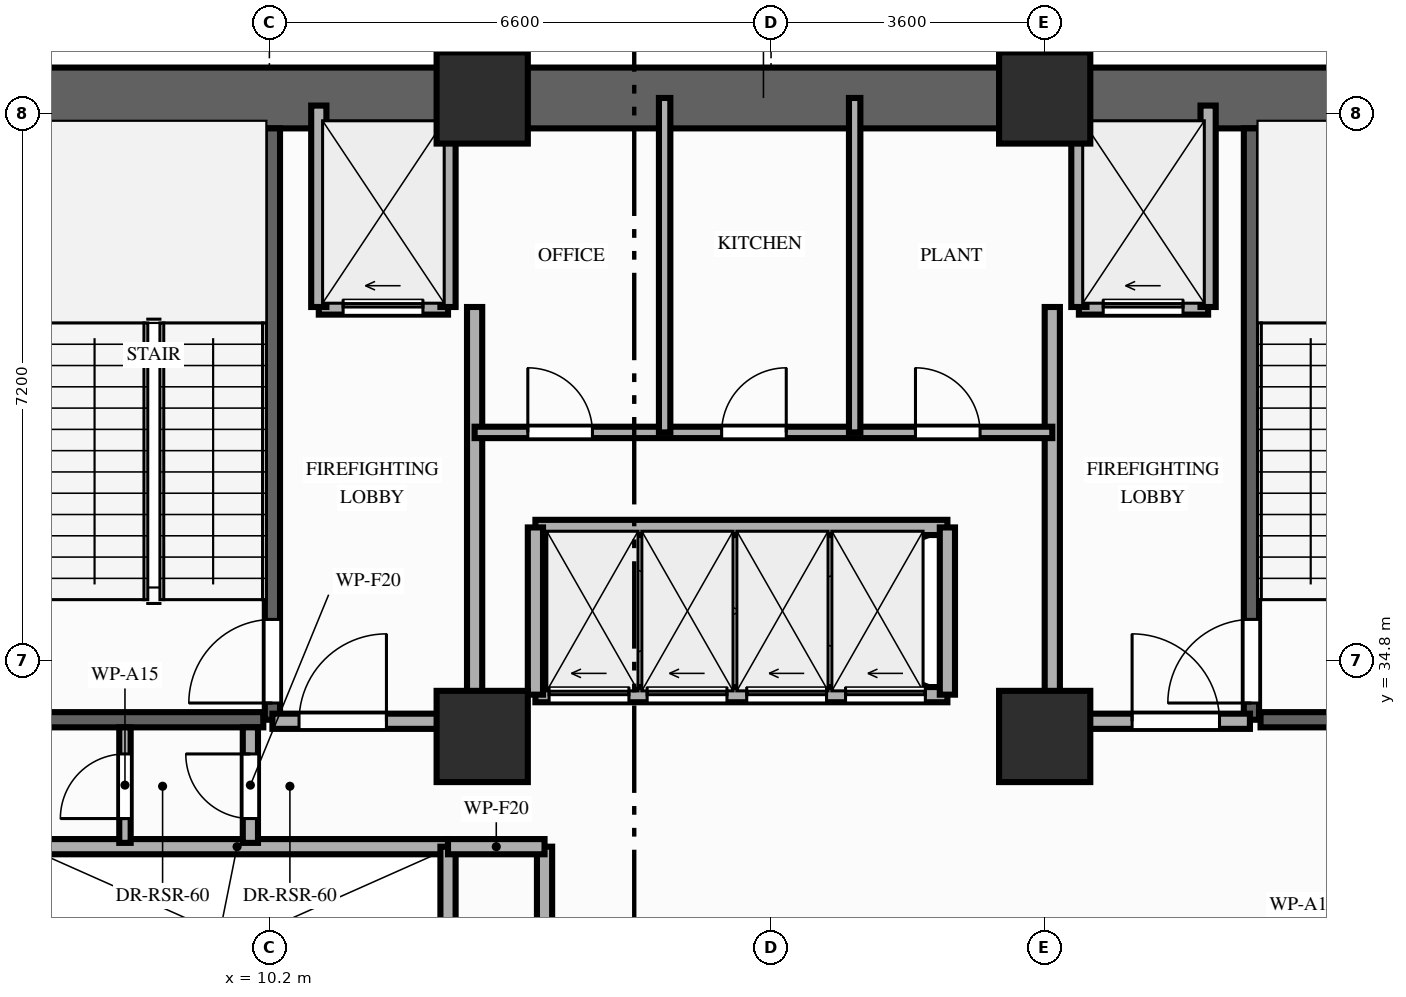
"""IFC4 building model, lengths in metres.
Left out: names, types, materials, properties, quantities, classifications, styles, units other than length and angle.
Written with IfcOpenShell. Run it as: python <this file> out.ifc"""

import sys

from ifc_helpers import new_model, si_unit, direction, frame, frame_2d, origin, origin_2d, place, context, subcontext, project, spatial, rectangle, extrude, element, fill, save


model = new_model("IFC4")
c1 = context("Model", 3, precision=1e-05, world=origin(), true_north=direction((0.0, 1.0)))
c2 = subcontext(c1, "Body", "Model", "MODEL_VIEW")
j1 = project(units=[si_unit("LENGTHUNIT", "METRE"), si_unit("PLANEANGLEUNIT", "RADIAN")], contexts=[c1])
p1 = place(None, origin())
s1 = spatial("IfcSite", under=j1, at=p1, CompositionType="ELEMENT")
p2 = place(p1, origin())
s2 = spatial("IfcBuilding", under=s1, at=p2, CompositionType="ELEMENT")
p3 = place(p2, frame((0.0, 0.0, 102.6)))
s3 = spatial("IfcBuildingStorey", under=s2, at=p3, CompositionType="ELEMENT", Elevation=102.6)
for number, where, z_axis, x_axis in (
    (1, (13.0, 33.8, 0.0), (0.0, 0.0, 1.0), (1.0, 0.0, 0.0)),
    (2, (20.4, 33.8, 0.0), (0.0, 0.0, 1.0), (1.0, 0.0, 0.0)),
    (3, (13.0, 42.2, 0.0), (0.0, 0.0, 1.0), (1.0, 0.0, 0.0)),
    (4, (20.4, 42.2, 0.0), (0.0, 0.0, 1.0), (1.0, 0.0, 0.0)),
):
    element("IfcColumn", number, at=place(p3, frame(where, z_axis=z_axis, x_axis=x_axis)), inside=s3, PredefinedType="COLUMN", context=c2, shape_type="SweptSolid", body=[
        extrude(rectangle(XDim=1.2, YDim=1.2, at=origin_2d()), origin(), (0.0, 0.0, 1.0), 4.8),
    ])
p4 = place(p3, frame((6.45, 42.2, 0.0), z_axis=(0.0, 0.0, 1.0), x_axis=(1.0, 0.0, 0.0)))
e5 = element("IfcWall", 5, at=p4, inside=s3, PredefinedType="SHEAR", context=c2, shape_type="SweptSolid", body=[
    extrude(rectangle(XDim=20.45, YDim=0.8, at=frame_2d((10.225, 0.0))), origin(), (0.0, 0.0, 1.0), 4.56),
])
p5 = place(p3, frame((10.24, 34.02, 0.0), z_axis=(0.0, 0.0, 1.0), x_axis=(0.0, 1.0, 0.0)))
e6 = element("IfcWall", 6, at=p5, inside=s3, PredefinedType="SHEAR", context=c2, shape_type="SweptSolid", body=[
    extrude(rectangle(XDim=7.78, YDim=0.2, at=frame_2d((3.89, 0.0))), origin(), (0.0, 0.0, 1.0), 4.56),
])
p6 = place(p5, frame((0.22, 0.0, 0.0)))
e7 = element("IfcOpeningElement", 7, at=p6, cuts=e6, PredefinedType="OPENING", context=c2, shape_type="SweptSolid", body=[
    extrude(rectangle(XDim=1.1, YDim=2.15, at=frame_2d((0.55, 1.075))), frame((0.0, 0.11, 0.0), z_axis=(0.0, -1.0, 0.0), x_axis=(1.0, 0.0, 0.0)), (0.0, 0.0, 1.0), 0.22),
])
p7 = place(p3, frame((7.24, 34.02, 0.0), z_axis=(0.0, 0.0, 1.0), x_axis=(1.0, 0.0, 0.0)))
e8 = element("IfcWall", 8, at=p7, inside=s3, PredefinedType="SHEAR", context=c2, shape_type="SweptSolid", body=[
    extrude(rectangle(XDim=2.88, YDim=0.2, at=frame_2d((1.44, 0.0))), origin(), (0.0, 0.0, 1.0), 4.56),
])
p8 = place(p3, frame((23.12, 34.02, 0.0), z_axis=(0.0, 0.0, 1.0), x_axis=(0.0, 1.0, 0.0)))
e9 = element("IfcWall", 9, at=p8, inside=s3, PredefinedType="SHEAR", context=c2, shape_type="SweptSolid", body=[
    extrude(rectangle(XDim=7.78, YDim=0.2, at=frame_2d((3.89, 0.0))), origin(), (0.0, 0.0, 1.0), 4.56),
])
p9 = place(p8, frame((0.22, 0.0, 0.0)))
e10 = element("IfcOpeningElement", 10, at=p9, cuts=e9, PredefinedType="OPENING", context=c2, shape_type="SweptSolid", body=[
    extrude(rectangle(XDim=1.1, YDim=2.15, at=frame_2d((0.55, 1.075))), frame((0.0, 0.11, 0.0), z_axis=(0.0, -1.0, 0.0), x_axis=(1.0, 0.0, 0.0)), (0.0, 0.0, 1.0), 0.22),
])
p10 = place(p3, frame((23.24, 34.02, 0.0), z_axis=(0.0, 0.0, 1.0), x_axis=(1.0, 0.0, 0.0)))
e11 = element("IfcWall", 11, at=p10, inside=s3, PredefinedType="SHEAR", context=c2, shape_type="SweptSolid", body=[
    extrude(rectangle(XDim=2.88, YDim=0.2, at=frame_2d((1.44, 0.0))), origin(), (0.0, 0.0, 1.0), 4.56),
])
p11 = place(p3, frame((7.0, 32.35, 0.0), z_axis=(0.0, 0.0, 1.0), x_axis=(1.0, 0.0, 0.0)))
e12 = element("IfcWall", 12, at=p11, inside=s3, PredefinedType="MOVABLE", context=c2, shape_type="SweptSolid", body=[
    extrude(rectangle(XDim=5.55, YDim=0.2, at=frame_2d((2.775, 0.0))), origin(), (0.0, 0.0, 1.0), 4.56),
])
p12 = place(p3, frame((12.55, 29.85, 0.0), z_axis=(0.0, 0.0, 1.0), x_axis=(0.0, 1.0, 0.0)))
e13 = element("IfcWall", 13, at=p12, inside=s3, PredefinedType="MOVABLE", context=c2, shape_type="SweptSolid", body=[
    extrude(rectangle(XDim=2.5, YDim=0.2, at=frame_2d((1.25, 0.0))), origin(), (0.0, 0.0, 1.0), 4.56),
])
p13 = place(p3, frame((10.85, 39.45, 0.0), z_axis=(0.0, 0.0, 1.0), x_axis=(1.0, 0.0, 0.0)))
e14 = element("IfcWall", 14, at=p13, inside=s3, PredefinedType="MOVABLE", context=c2, shape_type="SweptSolid", body=[
    extrude(rectangle(XDim=1.7, YDim=0.2, at=frame_2d((0.85, 0.0))), origin(), (0.0, 0.0, 1.0), 4.56),
])
p14 = place(p13, frame((0.32, 0.0, 0.0)))
e15 = element("IfcOpeningElement", 15, at=p14, cuts=e14, PredefinedType="OPENING", context=c2, shape_type="SweptSolid", body=[
    extrude(rectangle(XDim=1.05, YDim=2.15, at=frame_2d((0.525, 1.075))), frame((0.0, 0.11, 0.0), z_axis=(0.0, -1.0, 0.0), x_axis=(1.0, 0.0, 0.0)), (0.0, 0.0, 1.0), 0.22),
])
p15 = place(p3, frame((20.85, 39.45, 0.0), z_axis=(0.0, 0.0, 1.0), x_axis=(1.0, 0.0, 0.0)))
e16 = element("IfcWall", 16, at=p15, inside=s3, PredefinedType="MOVABLE", context=c2, shape_type="SweptSolid", body=[
    extrude(rectangle(XDim=1.7, YDim=0.2, at=frame_2d((0.85, 0.0))), origin(), (0.0, 0.0, 1.0), 4.56),
])
p16 = place(p15, frame((0.32, 0.0, 0.0)))
e17 = element("IfcOpeningElement", 17, at=p16, cuts=e16, PredefinedType="OPENING", context=c2, shape_type="SweptSolid", body=[
    extrude(rectangle(XDim=1.05, YDim=2.15, at=frame_2d((0.525, 1.075))), frame((0.0, 0.11, 0.0), z_axis=(0.0, -1.0, 0.0), x_axis=(1.0, 0.0, 0.0)), (0.0, 0.0, 1.0), 0.22),
])
for number, where, z_axis, x_axis in (
    (18, (10.85, 39.45, 0.0), (0.0, 0.0, 1.0), (0.0, 1.0, 0.0)),
    (19, (12.55, 39.45, 0.0), (0.0, 0.0, 1.0), (0.0, 1.0, 0.0)),
):
    element("IfcWall", number, at=place(p3, frame(where, z_axis=z_axis, x_axis=x_axis)), inside=s3, PredefinedType="MOVABLE", context=c2, shape_type="SweptSolid", body=[
        extrude(rectangle(XDim=2.65, YDim=0.2, at=frame_2d((1.325, 0.0))), origin(), (0.0, 0.0, 1.0), 3.95),
    ])
p17 = place(p3, frame((12.9, 34.0, 0.0), z_axis=(0.0, 0.0, 1.0), x_axis=(0.0, 1.0, 0.0)))
e20 = element("IfcWall", 20, at=p17, inside=s3, PredefinedType="PARTITIONING", context=c2, shape_type="SweptSolid", body=[
    extrude(rectangle(XDim=5.45, YDim=0.2, at=frame_2d((2.725, 0.0))), origin(), (0.0, 0.0, 1.0), 3.95),
])
p18 = place(p3, frame((10.24, 34.0, 0.0), z_axis=(0.0, 0.0, 1.0), x_axis=(1.0, 0.0, 0.0)))
e21 = element("IfcWall", 21, at=p18, inside=s3, PredefinedType="PARTITIONING", context=c2, shape_type="SweptSolid", body=[
    extrude(rectangle(XDim=2.66, YDim=0.2, at=frame_2d((1.33, 0.0))), origin(), (0.0, 0.0, 1.0), 3.95),
])
p19 = place(p18, frame((0.35, 0.0, 0.0)))
e22 = element("IfcOpeningElement", 22, at=p19, cuts=e21, PredefinedType="OPENING", context=c2, shape_type="SweptSolid", body=[
    extrude(rectangle(XDim=1.15, YDim=2.15, at=frame_2d((0.575, 1.075))), frame((0.0, 0.11, 0.0), z_axis=(0.0, -1.0, 0.0), x_axis=(1.0, 0.0, 0.0)), (0.0, 0.0, 1.0), 0.22),
])
for number, where, z_axis, x_axis in (
    (23, (20.85, 39.45, 0.0), (0.0, 0.0, 1.0), (0.0, 1.0, 0.0)),
    (24, (22.55, 39.45, 0.0), (0.0, 0.0, 1.0), (0.0, 1.0, 0.0)),
):
    element("IfcWall", number, at=place(p3, frame(where, z_axis=z_axis, x_axis=x_axis)), inside=s3, PredefinedType="MOVABLE", context=c2, shape_type="SweptSolid", body=[
        extrude(rectangle(XDim=2.65, YDim=0.2, at=frame_2d((1.325, 0.0))), origin(), (0.0, 0.0, 1.0), 3.95),
    ])
p20 = place(p3, frame((20.5, 34.0, 0.0), z_axis=(0.0, 0.0, 1.0), x_axis=(0.0, 1.0, 0.0)))
e25 = element("IfcWall", 25, at=p20, inside=s3, PredefinedType="PARTITIONING", context=c2, shape_type="SweptSolid", body=[
    extrude(rectangle(XDim=5.45, YDim=0.2, at=frame_2d((2.725, 0.0))), origin(), (0.0, 0.0, 1.0), 3.95),
])
p21 = place(p3, frame((20.5, 34.0, 0.0), z_axis=(0.0, 0.0, 1.0), x_axis=(1.0, 0.0, 0.0)))
e26 = element("IfcWall", 26, at=p21, inside=s3, PredefinedType="PARTITIONING", context=c2, shape_type="SweptSolid", body=[
    extrude(rectangle(XDim=2.6, YDim=0.2, at=frame_2d((1.3, 0.0))), origin(), (0.0, 0.0, 1.0), 3.95),
])
p22 = place(p21, frame((1.05, 0.0, 0.0)))
e27 = element("IfcOpeningElement", 27, at=p22, cuts=e26, PredefinedType="OPENING", context=c2, shape_type="SweptSolid", body=[
    extrude(rectangle(XDim=1.15, YDim=2.15, at=frame_2d((0.575, 1.075))), frame((0.0, 0.11, 0.0), z_axis=(0.0, -1.0, 0.0), x_axis=(1.0, 0.0, 0.0)), (0.0, 0.0, 1.0), 0.22),
])
p23 = place(p3, frame((9.95, 32.4, 0.0), z_axis=(0.0, 0.0, 1.0), x_axis=(0.0, 1.0, 0.0)))
e28 = element("IfcWall", 28, at=p23, inside=s3, PredefinedType="PARTITIONING", context=c2, shape_type="SweptSolid", body=[
    extrude(rectangle(XDim=1.52, YDim=0.2, at=frame_2d((0.76, 0.0))), origin(), (0.0, 0.0, 1.0), 3.95),
])
p24 = place(p23, frame((0.32, 0.0, 0.0)))
e29 = element("IfcOpeningElement", 29, at=p24, cuts=e28, PredefinedType="OPENING", context=c2, shape_type="SweptSolid", body=[
    extrude(rectangle(XDim=0.85, YDim=2.05, at=frame_2d((0.425, 1.025))), frame((0.0, 0.11, 0.0), z_axis=(0.0, -1.0, 0.0), x_axis=(1.0, 0.0, 0.0)), (0.0, 0.0, 1.0), 0.22),
])
p25 = place(p3, frame((8.3, 32.4, 0.0), z_axis=(0.0, 0.0, 1.0), x_axis=(0.0, 1.0, 0.0)))
e30 = element("IfcWall", 30, at=p25, inside=s3, PredefinedType="PARTITIONING", context=c2, shape_type="SweptSolid", body=[
    extrude(rectangle(XDim=1.52, YDim=0.15, at=frame_2d((0.76, 0.0))), origin(), (0.0, 0.0, 1.0), 3.95),
])
p26 = place(p25, frame((0.32, 0.0, 0.0)))
e31 = element("IfcOpeningElement", 31, at=p26, cuts=e30, PredefinedType="OPENING", context=c2, shape_type="SweptSolid", body=[
    extrude(rectangle(XDim=0.85, YDim=2.05, at=frame_2d((0.425, 1.025))), frame((0.0, 0.085, 0.0), z_axis=(0.0, -1.0, 0.0), x_axis=(1.0, 0.0, 0.0)), (0.0, 0.0, 1.0), 0.17),
])
p27 = place(p3, frame((13.82, 29.85, 0.0), z_axis=(0.0, 0.0, 1.0), x_axis=(0.0, 1.0, 0.0)))
e32 = element("IfcWall", 32, at=p27, inside=s3, PredefinedType="PARTITIONING", context=c2, shape_type="SweptSolid", body=[
    extrude(rectangle(XDim=2.5, YDim=0.2, at=frame_2d((1.25, 0.0))), origin(), (0.0, 0.0, 1.0), 4.56),
])
p28 = place(p3, frame((12.55, 32.35, 0.0), z_axis=(0.0, 0.0, 1.0), x_axis=(1.0, 0.0, 0.0)))
e33 = element("IfcWall", 33, at=p28, inside=s3, PredefinedType="PARTITIONING", context=c2, shape_type="SweptSolid", body=[
    extrude(rectangle(XDim=1.27, YDim=0.2, at=frame_2d((0.635, 0.0))), origin(), (0.0, 0.0, 1.0), 4.56),
])
p29 = place(p3, frame((12.9, 37.8, 0.0), z_axis=(0.0, 0.0, 1.0), x_axis=(1.0, 0.0, 0.0)))
e34 = element("IfcWall", 34, at=p29, inside=s3, PredefinedType="PARTITIONING", context=c2, shape_type="SweptSolid", body=[
    extrude(rectangle(XDim=7.6, YDim=0.15, at=frame_2d((3.8, 0.0))), origin(), (0.0, 0.0, 1.0), 4.56),
])
p30 = place(p29, frame((0.7, 0.0, 0.0)))
e35 = element("IfcOpeningElement", 35, at=p30, cuts=e34, PredefinedType="OPENING", context=c2, shape_type="SweptSolid", body=[
    extrude(rectangle(XDim=0.85, YDim=2.05, at=frame_2d((0.425, 1.025))), frame((0.0, 0.085, 0.0), z_axis=(0.0, -1.0, 0.0), x_axis=(1.0, 0.0, 0.0)), (0.0, 0.0, 1.0), 0.17),
])
p31 = place(p29, frame((3.25, 0.0, 0.0)))
e36 = element("IfcOpeningElement", 36, at=p31, cuts=e34, PredefinedType="OPENING", context=c2, shape_type="SweptSolid", body=[
    extrude(rectangle(XDim=0.85, YDim=2.05, at=frame_2d((0.425, 1.025))), frame((0.0, 0.085, 0.0), z_axis=(0.0, -1.0, 0.0), x_axis=(1.0, 0.0, 0.0)), (0.0, 0.0, 1.0), 0.17),
])
p32 = place(p29, frame((5.8, 0.0, 0.0)))
e37 = element("IfcOpeningElement", 37, at=p32, cuts=e34, PredefinedType="OPENING", context=c2, shape_type="SweptSolid", body=[
    extrude(rectangle(XDim=0.85, YDim=2.05, at=frame_2d((0.425, 1.025))), frame((0.0, 0.085, 0.0), z_axis=(0.0, -1.0, 0.0), x_axis=(1.0, 0.0, 0.0)), (0.0, 0.0, 1.0), 0.17),
])
for number, where, z_axis, x_axis in (
    (38, (15.4, 37.8, 0.0), (0.0, 0.0, 1.0), (0.0, 1.0, 0.0)),
    (39, (17.9, 37.8, 0.0), (0.0, 0.0, 1.0), (0.0, 1.0, 0.0)),
):
    element("IfcWall", number, at=place(p3, frame(where, z_axis=z_axis, x_axis=x_axis)), inside=s3, PredefinedType="PARTITIONING", context=c2, shape_type="SweptSolid", body=[
        extrude(rectangle(XDim=4.4, YDim=0.15, at=frame_2d((2.2, 0.0))), origin(), (0.0, 0.0, 1.0), 3.95),
    ])
p33 = place(p3, frame((13.7, 34.35, 0.0), z_axis=(0.0, 0.0, 1.0), x_axis=(1.0, 0.0, 0.0)))
e40 = element("IfcWall", 40, at=p33, inside=s3, PredefinedType="MOVABLE", context=c2, shape_type="SweptSolid", body=[
    extrude(rectangle(XDim=5.42, YDim=0.2, at=frame_2d((2.71, 0.0))), origin(), (0.0, 0.0, 1.0), 4.56),
])
p34 = place(p33, frame((0.18, 0.0, 0.0)))
e41 = element("IfcOpeningElement", 41, at=p34, cuts=e40, PredefinedType="OPENING", context=c2, shape_type="SweptSolid", body=[
    extrude(rectangle(XDim=1.05, YDim=2.15, at=frame_2d((0.525, 1.075))), frame((0.0, 0.11, 0.0), z_axis=(0.0, -1.0, 0.0), x_axis=(1.0, 0.0, 0.0)), (0.0, 0.0, 1.0), 0.22),
])
p35 = place(p33, frame((1.47, 0.0, 0.0)))
e42 = element("IfcOpeningElement", 42, at=p35, cuts=e40, PredefinedType="OPENING", context=c2, shape_type="SweptSolid", body=[
    extrude(rectangle(XDim=1.05, YDim=2.15, at=frame_2d((0.525, 1.075))), frame((0.0, 0.11, 0.0), z_axis=(0.0, -1.0, 0.0), x_axis=(1.0, 0.0, 0.0)), (0.0, 0.0, 1.0), 0.22),
])
p36 = place(p33, frame((2.78, 0.0, 0.0)))
e43 = element("IfcOpeningElement", 43, at=p36, cuts=e40, PredefinedType="OPENING", context=c2, shape_type="SweptSolid", body=[
    extrude(rectangle(XDim=1.05, YDim=2.15, at=frame_2d((0.525, 1.075))), frame((0.0, 0.11, 0.0), z_axis=(0.0, -1.0, 0.0), x_axis=(1.0, 0.0, 0.0)), (0.0, 0.0, 1.0), 0.22),
])
p37 = place(p33, frame((4.08, 0.0, 0.0)))
e44 = element("IfcOpeningElement", 44, at=p37, cuts=e40, PredefinedType="OPENING", context=c2, shape_type="SweptSolid", body=[
    extrude(rectangle(XDim=1.05, YDim=2.15, at=frame_2d((0.525, 1.075))), frame((0.0, 0.11, 0.0), z_axis=(0.0, -1.0, 0.0), x_axis=(1.0, 0.0, 0.0)), (0.0, 0.0, 1.0), 0.22),
])
p38 = place(p3, frame((13.7, 36.55, 0.0), z_axis=(0.0, 0.0, 1.0), x_axis=(1.0, 0.0, 0.0)))
e45 = element("IfcWall", 45, at=p38, inside=s3, PredefinedType="MOVABLE", context=c2, shape_type="SweptSolid", body=[
    extrude(rectangle(XDim=5.42, YDim=0.2, at=frame_2d((2.71, 0.0))), origin(), (0.0, 0.0, 1.0), 4.56),
])
for number, where, z_axis, x_axis in (
    (46, (13.7, 34.35, 0.0), (0.0, 0.0, 1.0), (0.0, 1.0, 0.0)),
    (47, (19.12, 34.35, 0.0), (0.0, 0.0, 1.0), (0.0, 1.0, 0.0)),
):
    element("IfcWall", number, at=place(p3, frame(where, z_axis=z_axis, x_axis=x_axis)), inside=s3, PredefinedType="MOVABLE", context=c2, shape_type="SweptSolid", body=[
        extrude(rectangle(XDim=2.2, YDim=0.2, at=frame_2d((1.1, 0.0))), origin(), (0.0, 0.0, 1.0), 4.56),
    ])
p39 = place(p6, origin())
e48 = element("IfcDoor", 48, at=p39, inside=s3, OperationType="SINGLE_SWING_LEFT", PredefinedType="DOOR", context=c2, shape_type="SweptSolid", body=[
    extrude(rectangle(XDim=1.1, YDim=2.15, at=frame_2d((0.55, 1.075))), frame((0.0, 0.025, 0.0), z_axis=(0.0, -1.0, 0.0), x_axis=(1.0, 0.0, 0.0)), (0.0, 0.0, 1.0), 0.05),
])
fill(e7, e48)
p40 = place(p9, origin())
e49 = element("IfcDoor", 49, at=p40, inside=s3, OperationType="SINGLE_SWING_LEFT", PredefinedType="DOOR", context=c2, shape_type="SweptSolid", body=[
    extrude(rectangle(XDim=1.1, YDim=2.15, at=frame_2d((0.55, 1.075))), frame((0.0, 0.025, 0.0), z_axis=(0.0, -1.0, 0.0), x_axis=(1.0, 0.0, 0.0)), (0.0, 0.0, 1.0), 0.05),
])
fill(e10, e49)
p41 = place(p14, origin())
e50 = element("IfcDoor", 50, at=p41, inside=s3, OperationType="SLIDING_TO_LEFT", PredefinedType="DOOR", context=c2, shape_type="SweptSolid", body=[
    extrude(rectangle(XDim=1.05, YDim=2.15, at=frame_2d((0.525, 1.075))), frame((0.0, 0.025, 0.0), z_axis=(0.0, -1.0, 0.0), x_axis=(1.0, 0.0, 0.0)), (0.0, 0.0, 1.0), 0.05),
])
fill(e15, e50)
p42 = place(p16, origin())
e51 = element("IfcDoor", 51, at=p42, inside=s3, OperationType="SLIDING_TO_LEFT", PredefinedType="DOOR", context=c2, shape_type="SweptSolid", body=[
    extrude(rectangle(XDim=1.05, YDim=2.15, at=frame_2d((0.525, 1.075))), frame((0.0, 0.025, 0.0), z_axis=(0.0, -1.0, 0.0), x_axis=(1.0, 0.0, 0.0)), (0.0, 0.0, 1.0), 0.05),
])
fill(e17, e51)
p43 = place(p19, origin())
e52 = element("IfcDoor", 52, at=p43, inside=s3, OperationType="SINGLE_SWING_RIGHT", PredefinedType="DOOR", context=c2, shape_type="SweptSolid", body=[
    extrude(rectangle(XDim=1.15, YDim=2.15, at=frame_2d((0.575, 1.075))), frame((0.0, 0.025, 0.0), z_axis=(0.0, -1.0, 0.0), x_axis=(1.0, 0.0, 0.0)), (0.0, 0.0, 1.0), 0.05),
])
fill(e22, e52)
p44 = place(p22, origin())
e53 = element("IfcDoor", 53, at=p44, inside=s3, OperationType="SINGLE_SWING_LEFT", PredefinedType="DOOR", context=c2, shape_type="SweptSolid", body=[
    extrude(rectangle(XDim=1.15, YDim=2.15, at=frame_2d((0.575, 1.075))), frame((0.0, 0.025, 0.0), z_axis=(0.0, -1.0, 0.0), x_axis=(1.0, 0.0, 0.0)), (0.0, 0.0, 1.0), 0.05),
])
fill(e27, e53)
p45 = place(p24, origin())
e54 = element("IfcDoor", 54, at=p45, inside=s3, OperationType="SINGLE_SWING_RIGHT", PredefinedType="DOOR", context=c2, shape_type="SweptSolid", body=[
    extrude(rectangle(XDim=0.85, YDim=2.05, at=frame_2d((0.425, 1.025))), frame((0.0, 0.025, 0.0), z_axis=(0.0, -1.0, 0.0), x_axis=(1.0, 0.0, 0.0)), (0.0, 0.0, 1.0), 0.05),
])
fill(e29, e54)
p46 = place(p26, origin())
e55 = element("IfcDoor", 55, at=p46, inside=s3, OperationType="SINGLE_SWING_LEFT", PredefinedType="DOOR", context=c2, shape_type="SweptSolid", body=[
    extrude(rectangle(XDim=0.85, YDim=2.05, at=frame_2d((0.425, 1.025))), frame((0.0, 0.025, 0.0), z_axis=(0.0, -1.0, 0.0), x_axis=(1.0, 0.0, 0.0)), (0.0, 0.0, 1.0), 0.05),
])
fill(e31, e55)
p47 = place(p30, origin())
e56 = element("IfcDoor", 56, at=p47, inside=s3, OperationType="SINGLE_SWING_LEFT", PredefinedType="DOOR", context=c2, shape_type="SweptSolid", body=[
    extrude(rectangle(XDim=0.85, YDim=2.05, at=frame_2d((0.425, 1.025))), frame((0.0, 0.025, 0.0), z_axis=(0.0, -1.0, 0.0), x_axis=(1.0, 0.0, 0.0)), (0.0, 0.0, 1.0), 0.05),
])
fill(e35, e56)
p48 = place(p31, origin())
e57 = element("IfcDoor", 57, at=p48, inside=s3, OperationType="SINGLE_SWING_RIGHT", PredefinedType="DOOR", context=c2, shape_type="SweptSolid", body=[
    extrude(rectangle(XDim=0.85, YDim=2.05, at=frame_2d((0.425, 1.025))), frame((0.0, 0.025, 0.0), z_axis=(0.0, -1.0, 0.0), x_axis=(1.0, 0.0, 0.0)), (0.0, 0.0, 1.0), 0.05),
])
fill(e36, e57)
p49 = place(p32, origin())
e58 = element("IfcDoor", 58, at=p49, inside=s3, OperationType="SINGLE_SWING_LEFT", PredefinedType="DOOR", context=c2, shape_type="SweptSolid", body=[
    extrude(rectangle(XDim=0.85, YDim=2.05, at=frame_2d((0.425, 1.025))), frame((0.0, 0.025, 0.0), z_axis=(0.0, -1.0, 0.0), x_axis=(1.0, 0.0, 0.0)), (0.0, 0.0, 1.0), 0.05),
])
fill(e37, e58)
p50 = place(p34, origin())
e59 = element("IfcDoor", 59, at=p50, inside=s3, OperationType="SLIDING_TO_LEFT", PredefinedType="DOOR", context=c2, shape_type="SweptSolid", body=[
    extrude(rectangle(XDim=1.05, YDim=2.15, at=frame_2d((0.525, 1.075))), frame((0.0, 0.025, 0.0), z_axis=(0.0, -1.0, 0.0), x_axis=(1.0, 0.0, 0.0)), (0.0, 0.0, 1.0), 0.05),
])
fill(e41, e59)
p51 = place(p35, origin())
e60 = element("IfcDoor", 60, at=p51, inside=s3, OperationType="SLIDING_TO_LEFT", PredefinedType="DOOR", context=c2, shape_type="SweptSolid", body=[
    extrude(rectangle(XDim=1.05, YDim=2.15, at=frame_2d((0.525, 1.075))), frame((0.0, 0.025, 0.0), z_axis=(0.0, -1.0, 0.0), x_axis=(1.0, 0.0, 0.0)), (0.0, 0.0, 1.0), 0.05),
])
fill(e42, e60)
p52 = place(p36, origin())
e61 = element("IfcDoor", 61, at=p52, inside=s3, OperationType="SLIDING_TO_LEFT", PredefinedType="DOOR", context=c2, shape_type="SweptSolid", body=[
    extrude(rectangle(XDim=1.05, YDim=2.15, at=frame_2d((0.525, 1.075))), frame((0.0, 0.025, 0.0), z_axis=(0.0, -1.0, 0.0), x_axis=(1.0, 0.0, 0.0)), (0.0, 0.0, 1.0), 0.05),
])
fill(e43, e61)
p53 = place(p37, origin())
e62 = element("IfcDoor", 62, at=p53, inside=s3, OperationType="SLIDING_TO_LEFT", PredefinedType="DOOR", context=c2, shape_type="SweptSolid", body=[
    extrude(rectangle(XDim=1.05, YDim=2.15, at=frame_2d((0.525, 1.075))), frame((0.0, 0.025, 0.0), z_axis=(0.0, -1.0, 0.0), x_axis=(1.0, 0.0, 0.0)), (0.0, 0.0, 1.0), 0.05),
])
fill(e44, e62)
save(model, sys.argv[1])
